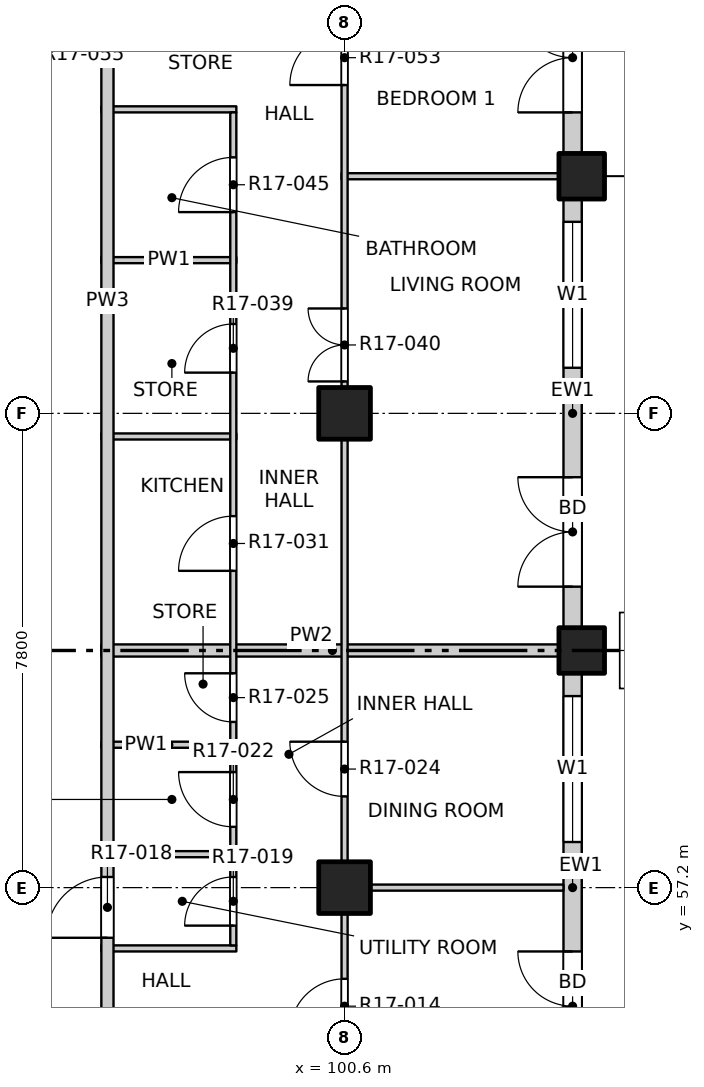
"""IFC4 building model, lengths in metres.
Left out: names, types, materials, properties, quantities, classifications, styles, units other than length and angle.
Written with IfcOpenShell. Run it as: python <this file> out.ifc"""

import sys

from ifc_helpers import new_model, si_unit, direction, frame, frame_2d, origin, origin_2d, place, context, subcontext, project, spatial, rectangle, extrude, element, fill, save


model = new_model("IFC4")
c1 = context("Model", 3, precision=1e-05, world=origin(), true_north=direction((0.0, 1.0)))
c2 = subcontext(c1, "Body", "Model", "MODEL_VIEW")
j1 = project(units=[si_unit("LENGTHUNIT", "METRE"), si_unit("PLANEANGLEUNIT", "RADIAN")], contexts=[c1])
p1 = place(None, origin())
s1 = spatial("IfcSite", under=j1, at=p1, CompositionType="ELEMENT")
p2 = place(p1, origin())
s2 = spatial("IfcBuilding", under=s1, at=p2, CompositionType="ELEMENT")
p3 = place(p2, frame((0.0, 0.0, 182.6)))
s3 = spatial("IfcBuildingStorey", under=s2, at=p3, CompositionType="ELEMENT", Elevation=182.6)
for number, where, z_axis, x_axis in (
    (1, (104.5, 61.1, -0.25), (0.0, 0.0, 1.0), (1.0, 0.0, 0.0)),
    (2, (104.5, 68.9, -0.25), (0.0, 0.0, 1.0), (1.0, 0.0, 0.0)),
):
    element("IfcColumn", number, at=place(p3, frame(where, z_axis=z_axis, x_axis=x_axis)), inside=s3, PredefinedType="COLUMN", context=c2, shape_type="SweptSolid", body=[
        extrude(rectangle(XDim=0.75, YDim=0.75, at=origin_2d()), origin(), (0.0, 0.0, 1.0), 3.4),
    ])
for number, where, z_axis, x_axis in (
    (3, (100.6, 57.2, -0.25), (0.0, 0.0, 1.0), (1.0, 0.0, 0.0)),
    (4, (100.6, 65.0, -0.25), (0.0, 0.0, 1.0), (1.0, 0.0, 0.0)),
):
    element("IfcColumn", number, at=place(p3, frame(where, z_axis=z_axis, x_axis=x_axis)), inside=s3, PredefinedType="COLUMN", context=c2, shape_type="SweptSolid", body=[
        extrude(rectangle(XDim=0.85, YDim=0.85, at=origin_2d()), origin(), (0.0, 0.0, 1.0), 3.4),
    ])
p4 = place(p3, frame((104.35, 53.675, 0.0), z_axis=(0.0, 0.0, 1.0), x_axis=(0.0, 1.0, 0.0)))
e5 = element("IfcWall", 5, at=p4, inside=s3, PredefinedType="SOLIDWALL", context=c2, shape_type="SweptSolid", body=[
    extrude(rectangle(XDim=7.05, YDim=0.3, at=frame_2d((3.525, 0.0))), origin(), (0.0, 0.0, 1.0), 2.7),
])
p5 = place(p4, frame((0.675, 0.0, 0.0)))
e6 = element("IfcOpeningElement", 6, at=p5, cuts=e5, PredefinedType="OPENING", context=c2, shape_type="SweptSolid", body=[
    extrude(rectangle(XDim=1.8, YDim=2.4, at=frame_2d((0.9, 1.2))), frame((0.0, 0.16, 0.0), z_axis=(0.0, -1.0, 0.0), x_axis=(1.0, 0.0, 0.0)), (0.0, 0.0, 1.0), 0.32),
])
p6 = place(p4, frame((4.275, 0.0, 0.9)))
e7 = element("IfcOpeningElement", 7, at=p6, cuts=e5, PredefinedType="OPENING", context=c2, shape_type="SweptSolid", body=[
    extrude(rectangle(XDim=2.4, YDim=1.8, at=frame_2d((1.2, 0.9))), frame((0.0, 0.16, 0.0), z_axis=(0.0, -1.0, 0.0), x_axis=(1.0, 0.0, 0.0)), (0.0, 0.0, 1.0), 0.32),
])
p7 = place(p3, frame((104.35, 61.475, 0.0), z_axis=(0.0, 0.0, 1.0), x_axis=(0.0, 1.0, 0.0)))
e8 = element("IfcWall", 8, at=p7, inside=s3, PredefinedType="SOLIDWALL", context=c2, shape_type="SweptSolid", body=[
    extrude(rectangle(XDim=7.05, YDim=0.3, at=frame_2d((3.525, 0.0))), origin(), (0.0, 0.0, 1.0), 2.7),
])
p8 = place(p7, frame((0.675, 0.0, 0.0)))
e9 = element("IfcOpeningElement", 9, at=p8, cuts=e8, PredefinedType="OPENING", context=c2, shape_type="SweptSolid", body=[
    extrude(rectangle(XDim=1.8, YDim=2.4, at=frame_2d((0.9, 1.2))), frame((0.0, 0.16, 0.0), z_axis=(0.0, -1.0, 0.0), x_axis=(1.0, 0.0, 0.0)), (0.0, 0.0, 1.0), 0.32),
])
p9 = place(p7, frame((4.275, 0.0, 0.9)))
e10 = element("IfcOpeningElement", 10, at=p9, cuts=e8, PredefinedType="OPENING", context=c2, shape_type="SweptSolid", body=[
    extrude(rectangle(XDim=2.4, YDim=1.8, at=frame_2d((1.2, 0.9))), frame((0.0, 0.16, 0.0), z_axis=(0.0, -1.0, 0.0), x_axis=(1.0, 0.0, 0.0)), (0.0, 0.0, 1.0), 0.32),
])
p10 = place(p3, frame((104.35, 69.275, 0.0), z_axis=(0.0, 0.0, 1.0), x_axis=(0.0, 1.0, 0.0)))
e11 = element("IfcWall", 11, at=p10, inside=s3, PredefinedType="SOLIDWALL", context=c2, shape_type="SweptSolid", body=[
    extrude(rectangle(XDim=7.05, YDim=0.3, at=frame_2d((3.525, 0.0))), origin(), (0.0, 0.0, 1.0), 2.7),
])
p11 = place(p10, frame((0.675, 0.0, 0.0)))
e12 = element("IfcOpeningElement", 12, at=p11, cuts=e11, PredefinedType="OPENING", context=c2, shape_type="SweptSolid", body=[
    extrude(rectangle(XDim=1.8, YDim=2.4, at=frame_2d((0.9, 1.2))), frame((0.0, 0.16, 0.0), z_axis=(0.0, -1.0, 0.0), x_axis=(1.0, 0.0, 0.0)), (0.0, 0.0, 1.0), 0.32),
])
p12 = place(p10, frame((4.275, 0.0, 0.9)))
e13 = element("IfcOpeningElement", 13, at=p12, cuts=e11, PredefinedType="OPENING", context=c2, shape_type="SweptSolid", body=[
    extrude(rectangle(XDim=2.4, YDim=1.8, at=frame_2d((1.2, 0.9))), frame((0.0, 0.16, 0.0), z_axis=(0.0, -1.0, 0.0), x_axis=(1.0, 0.0, 0.0)), (0.0, 0.0, 1.0), 0.32),
])
p13 = place(p3, frame((96.6, 56.2, 0.0), z_axis=(0.0, 0.0, 1.0), x_axis=(1.0, 0.0, 0.0)))
e14 = element("IfcWall", 14, at=p13, inside=s3, PredefinedType="PARTITIONING", context=c2, shape_type="SweptSolid", body=[
    extrude(rectangle(XDim=2.22, YDim=0.1, at=frame_2d((1.11, 0.0))), origin(), (0.0, 0.0, 1.0), 3.15),
])
p14 = place(p3, frame((100.55, 57.2, 0.0), z_axis=(0.0, 0.0, 1.0), x_axis=(1.0, 0.0, 0.0)))
e15 = element("IfcWall", 15, at=p14, inside=s3, PredefinedType="PARTITIONING", context=c2, shape_type="SweptSolid", body=[
    extrude(rectangle(XDim=3.65, YDim=0.1, at=frame_2d((1.825, 0.0))), origin(), (0.0, 0.0, 1.0), 3.15),
])
for number, where, z_axis, x_axis in (
    (16, (96.6, 57.75, 0.0), (0.0, 0.0, 1.0), (1.0, 0.0, 0.0)),
    (17, (96.6, 59.55, 0.0), (0.0, 0.0, 1.0), (1.0, 0.0, 0.0)),
):
    element("IfcWall", number, at=place(p3, frame(where, z_axis=z_axis, x_axis=x_axis)), inside=s3, PredefinedType="PARTITIONING", context=c2, shape_type="SweptSolid", body=[
        extrude(rectangle(XDim=2.22, YDim=0.1, at=frame_2d((1.11, 0.0))), origin(), (0.0, 0.0, 1.0), 3.15),
    ])
p15 = place(p3, frame((96.6, 61.1, 0.0), z_axis=(0.0, 0.0, 1.0), x_axis=(1.0, 0.0, 0.0)))
e18 = element("IfcWall", 18, at=p15, inside=s3, PredefinedType="PARTITIONING", context=c2, shape_type="SweptSolid", body=[
    extrude(rectangle(XDim=7.6, YDim=0.2, at=frame_2d((3.8, 0.0))), origin(), (0.0, 0.0, 1.0), 2.55),
])
for number, where, z_axis, x_axis in (
    (19, (96.6, 64.62, 0.0), (0.0, 0.0, 1.0), (1.0, 0.0, 0.0)),
    (20, (96.6, 67.52, 0.0), (0.0, 0.0, 1.0), (1.0, 0.0, 0.0)),
):
    element("IfcWall", number, at=place(p3, frame(where, z_axis=z_axis, x_axis=x_axis)), inside=s3, PredefinedType="PARTITIONING", context=c2, shape_type="SweptSolid", body=[
        extrude(rectangle(XDim=2.22, YDim=0.1, at=frame_2d((1.11, 0.0))), origin(), (0.0, 0.0, 1.0), 3.15),
    ])
p16 = place(p3, frame((100.55, 68.9, 0.0), z_axis=(0.0, 0.0, 1.0), x_axis=(1.0, 0.0, 0.0)))
e21 = element("IfcWall", 21, at=p16, inside=s3, PredefinedType="PARTITIONING", context=c2, shape_type="SweptSolid", body=[
    extrude(rectangle(XDim=3.65, YDim=0.1, at=frame_2d((1.825, 0.0))), origin(), (0.0, 0.0, 1.0), 2.55),
])
p17 = place(p3, frame((96.6, 70.0, 0.0), z_axis=(0.0, 0.0, 1.0), x_axis=(1.0, 0.0, 0.0)))
e22 = element("IfcWall", 22, at=p17, inside=s3, PredefinedType="PARTITIONING", context=c2, shape_type="SweptSolid", body=[
    extrude(rectangle(XDim=2.22, YDim=0.1, at=frame_2d((1.11, 0.0))), origin(), (0.0, 0.0, 1.0), 3.15),
])
p18 = place(p3, frame((96.7, 49.5, 0.0), z_axis=(0.0, 0.0, 1.0), x_axis=(0.0, 1.0, 0.0)))
e23 = element("IfcWall", 23, at=p18, inside=s3, PredefinedType="PARTITIONING", context=c2, shape_type="SweptSolid", body=[
    extrude(rectangle(XDim=34.7, YDim=0.2, at=frame_2d((17.35, 0.0))), origin(), (0.0, 0.0, 1.0), 3.15),
])
p19 = place(p18, frame((6.875, 0.0, 0.0)))
e24 = element("IfcOpeningElement", 24, at=p19, cuts=e23, PredefinedType="OPENING", context=c2, shape_type="SweptSolid", body=[
    extrude(rectangle(XDim=1.0, YDim=2.1, at=frame_2d((0.5, 1.05))), frame((0.0, 0.11, 0.0), z_axis=(0.0, -1.0, 0.0), x_axis=(1.0, 0.0, 0.0)), (0.0, 0.0, 1.0), 0.22),
])
p20 = place(p18, frame((21.775, 0.0, 0.0)))
e25 = element("IfcOpeningElement", 25, at=p20, cuts=e23, PredefinedType="OPENING", context=c2, shape_type="SweptSolid", body=[
    extrude(rectangle(XDim=1.0, YDim=2.1, at=frame_2d((0.5, 1.05))), frame((0.0, 0.11, 0.0), z_axis=(0.0, -1.0, 0.0), x_axis=(1.0, 0.0, 0.0)), (0.0, 0.0, 1.0), 0.22),
])
p21 = place(p18, frame((27.725, 0.0, 0.0)))
e26 = element("IfcOpeningElement", 26, at=p21, cuts=e23, PredefinedType="OPENING", context=c2, shape_type="SweptSolid", body=[
    extrude(rectangle(XDim=1.0, YDim=2.1, at=frame_2d((0.5, 1.05))), frame((0.0, 0.11, 0.0), z_axis=(0.0, -1.0, 0.0), x_axis=(1.0, 0.0, 0.0)), (0.0, 0.0, 1.0), 0.22),
])
p22 = place(p3, frame((98.77, 56.25, 0.0), z_axis=(0.0, 0.0, 1.0), x_axis=(0.0, 1.0, 0.0)))
e27 = element("IfcWall", 27, at=p22, inside=s3, PredefinedType="PARTITIONING", context=c2, shape_type="SweptSolid", body=[
    extrude(rectangle(XDim=13.7, YDim=0.1, at=frame_2d((6.85, 0.0))), origin(), (0.0, 0.0, 1.0), 3.15),
])
p23 = place(p22, frame((0.325, 0.0, 0.0)))
e28 = element("IfcOpeningElement", 28, at=p23, cuts=e27, PredefinedType="OPENING", context=c2, shape_type="SweptSolid", body=[
    extrude(rectangle(XDim=0.8, YDim=2.1, at=frame_2d((0.4, 1.05))), frame((0.0, 0.06, 0.0), z_axis=(0.0, -1.0, 0.0), x_axis=(1.0, 0.0, 0.0)), (0.0, 0.0, 1.0), 0.12),
])
p24 = place(p22, frame((1.95, 0.0, 0.0)))
e29 = element("IfcOpeningElement", 29, at=p24, cuts=e27, PredefinedType="OPENING", context=c2, shape_type="SweptSolid", body=[
    extrude(rectangle(XDim=0.9, YDim=2.1, at=frame_2d((0.45, 1.05))), frame((0.0, 0.06, 0.0), z_axis=(0.0, -1.0, 0.0), x_axis=(1.0, 0.0, 0.0)), (0.0, 0.0, 1.0), 0.12),
])
p25 = place(p22, frame((3.675, 0.0, 0.0)))
e30 = element("IfcOpeningElement", 30, at=p25, cuts=e27, PredefinedType="OPENING", context=c2, shape_type="SweptSolid", body=[
    extrude(rectangle(XDim=0.8, YDim=2.1, at=frame_2d((0.4, 1.05))), frame((0.0, 0.06, 0.0), z_axis=(0.0, -1.0, 0.0), x_axis=(1.0, 0.0, 0.0)), (0.0, 0.0, 1.0), 0.12),
])
p26 = place(p22, frame((6.16, 0.0, 0.0)))
e31 = element("IfcOpeningElement", 31, at=p26, cuts=e27, PredefinedType="OPENING", context=c2, shape_type="SweptSolid", body=[
    extrude(rectangle(XDim=0.9, YDim=2.1, at=frame_2d((0.45, 1.05))), frame((0.0, 0.06, 0.0), z_axis=(0.0, -1.0, 0.0), x_axis=(1.0, 0.0, 0.0)), (0.0, 0.0, 1.0), 0.12),
])
p27 = place(p22, frame((9.42, 0.0, 0.0)))
e32 = element("IfcOpeningElement", 32, at=p27, cuts=e27, PredefinedType="OPENING", context=c2, shape_type="SweptSolid", body=[
    extrude(rectangle(XDim=0.8, YDim=2.1, at=frame_2d((0.4, 1.05))), frame((0.0, 0.06, 0.0), z_axis=(0.0, -1.0, 0.0), x_axis=(1.0, 0.0, 0.0)), (0.0, 0.0, 1.0), 0.12),
])
p28 = place(p22, frame((12.06, 0.0, 0.0)))
e33 = element("IfcOpeningElement", 33, at=p28, cuts=e27, PredefinedType="OPENING", context=c2, shape_type="SweptSolid", body=[
    extrude(rectangle(XDim=0.9, YDim=2.1, at=frame_2d((0.45, 1.05))), frame((0.0, 0.06, 0.0), z_axis=(0.0, -1.0, 0.0), x_axis=(1.0, 0.0, 0.0)), (0.0, 0.0, 1.0), 0.12),
])
p29 = place(p3, frame((100.6, 45.8, 0.0), z_axis=(0.0, 0.0, 1.0), x_axis=(0.0, 1.0, 0.0)))
e34 = element("IfcWall", 34, at=p29, inside=s3, PredefinedType="PARTITIONING", context=c2, shape_type="SweptSolid", body=[
    extrude(rectangle(XDim=38.4, YDim=0.1, at=frame_2d((19.2, 0.0))), origin(), (0.0, 0.0, 1.0), 3.15),
])
p30 = place(p29, frame((1.05, 0.0, 0.0)))
e35 = element("IfcOpeningElement", 35, at=p30, cuts=e34, PredefinedType="OPENING", context=c2, shape_type="SweptSolid", body=[
    extrude(rectangle(XDim=1.2, YDim=2.1, at=frame_2d((0.6, 1.05))), frame((0.0, 0.06, 0.0), z_axis=(0.0, -1.0, 0.0), x_axis=(1.0, 0.0, 0.0)), (0.0, 0.0, 1.0), 0.12),
])
p31 = place(p29, frame((5.1, 0.0, 0.0)))
e36 = element("IfcOpeningElement", 36, at=p31, cuts=e34, PredefinedType="OPENING", context=c2, shape_type="SweptSolid", body=[
    extrude(rectangle(XDim=0.9, YDim=2.1, at=frame_2d((0.45, 1.05))), frame((0.0, 0.06, 0.0), z_axis=(0.0, -1.0, 0.0), x_axis=(1.0, 0.0, 0.0)), (0.0, 0.0, 1.0), 0.12),
])
p32 = place(p29, frame((9.0, 0.0, 0.0)))
e37 = element("IfcOpeningElement", 37, at=p32, cuts=e34, PredefinedType="OPENING", context=c2, shape_type="SweptSolid", body=[
    extrude(rectangle(XDim=0.9, YDim=2.1, at=frame_2d((0.45, 1.05))), frame((0.0, 0.06, 0.0), z_axis=(0.0, -1.0, 0.0), x_axis=(1.0, 0.0, 0.0)), (0.0, 0.0, 1.0), 0.12),
])
p33 = place(p29, frame((12.9, 0.0, 0.0)))
e38 = element("IfcOpeningElement", 38, at=p33, cuts=e34, PredefinedType="OPENING", context=c2, shape_type="SweptSolid", body=[
    extrude(rectangle(XDim=0.9, YDim=2.1, at=frame_2d((0.45, 1.05))), frame((0.0, 0.06, 0.0), z_axis=(0.0, -1.0, 0.0), x_axis=(1.0, 0.0, 0.0)), (0.0, 0.0, 1.0), 0.12),
])
p34 = place(p29, frame((19.725, 0.0, 0.0)))
e39 = element("IfcOpeningElement", 39, at=p34, cuts=e34, PredefinedType="OPENING", context=c2, shape_type="SweptSolid", body=[
    extrude(rectangle(XDim=1.2, YDim=2.1, at=frame_2d((0.6, 1.05))), frame((0.0, 0.06, 0.0), z_axis=(0.0, -1.0, 0.0), x_axis=(1.0, 0.0, 0.0)), (0.0, 0.0, 1.0), 0.12),
])
p35 = place(p29, frame((24.6, 0.0, 0.0)))
e40 = element("IfcOpeningElement", 40, at=p35, cuts=e34, PredefinedType="OPENING", context=c2, shape_type="SweptSolid", body=[
    extrude(rectangle(XDim=0.9, YDim=2.1, at=frame_2d((0.45, 1.05))), frame((0.0, 0.06, 0.0), z_axis=(0.0, -1.0, 0.0), x_axis=(1.0, 0.0, 0.0)), (0.0, 0.0, 1.0), 0.12),
])
p36 = place(p29, frame((28.5, 0.0, 0.0)))
e41 = element("IfcOpeningElement", 41, at=p36, cuts=e34, PredefinedType="OPENING", context=c2, shape_type="SweptSolid", body=[
    extrude(rectangle(XDim=0.9, YDim=2.1, at=frame_2d((0.45, 1.05))), frame((0.0, 0.06, 0.0), z_axis=(0.0, -1.0, 0.0), x_axis=(1.0, 0.0, 0.0)), (0.0, 0.0, 1.0), 0.12),
])
p37 = place(p29, frame((32.4, 0.0, 0.0)))
e42 = element("IfcOpeningElement", 42, at=p37, cuts=e34, PredefinedType="OPENING", context=c2, shape_type="SweptSolid", body=[
    extrude(rectangle(XDim=0.9, YDim=2.1, at=frame_2d((0.45, 1.05))), frame((0.0, 0.06, 0.0), z_axis=(0.0, -1.0, 0.0), x_axis=(1.0, 0.0, 0.0)), (0.0, 0.0, 1.0), 0.12),
])
p38 = place(p29, frame((36.15, 0.0, 0.0)))
e43 = element("IfcOpeningElement", 43, at=p38, cuts=e34, PredefinedType="OPENING", context=c2, shape_type="SweptSolid", body=[
    extrude(rectangle(XDim=1.2, YDim=2.1, at=frame_2d((0.6, 1.05))), frame((0.0, 0.06, 0.0), z_axis=(0.0, -1.0, 0.0), x_axis=(1.0, 0.0, 0.0)), (0.0, 0.0, 1.0), 0.12),
])
p39 = place(p5, origin())
e44 = element("IfcDoor", 44, at=p39, inside=s3, OperationType="DOUBLE_DOOR_SINGLE_SWING", PredefinedType="DOOR", context=c2, shape_type="SweptSolid", body=[
    extrude(rectangle(XDim=1.8, YDim=2.4, at=frame_2d((0.9, 1.2))), frame((0.0, 0.025, 0.0), z_axis=(0.0, -1.0, 0.0), x_axis=(1.0, 0.0, 0.0)), (0.0, 0.0, 1.0), 0.05),
])
fill(e6, e44)
p40 = place(p6, origin())
e45 = element("IfcWindow", 45, at=p40, inside=s3, PartitioningType="DOUBLE_PANEL_VERTICAL", PredefinedType="WINDOW", context=c2, shape_type="SweptSolid", body=[
    extrude(rectangle(XDim=2.4, YDim=1.8, at=frame_2d((1.2, 0.9))), frame((0.0, 0.03, 0.0), z_axis=(0.0, -1.0, 0.0), x_axis=(1.0, 0.0, 0.0)), (0.0, 0.0, 1.0), 0.06),
])
fill(e7, e45)
p41 = place(p8, origin())
e46 = element("IfcDoor", 46, at=p41, inside=s3, OperationType="DOUBLE_DOOR_SINGLE_SWING", PredefinedType="DOOR", context=c2, shape_type="SweptSolid", body=[
    extrude(rectangle(XDim=1.8, YDim=2.4, at=frame_2d((0.9, 1.2))), frame((0.0, 0.025, 0.0), z_axis=(0.0, -1.0, 0.0), x_axis=(1.0, 0.0, 0.0)), (0.0, 0.0, 1.0), 0.05),
])
fill(e9, e46)
p42 = place(p9, origin())
e47 = element("IfcWindow", 47, at=p42, inside=s3, PartitioningType="DOUBLE_PANEL_VERTICAL", PredefinedType="WINDOW", context=c2, shape_type="SweptSolid", body=[
    extrude(rectangle(XDim=2.4, YDim=1.8, at=frame_2d((1.2, 0.9))), frame((0.0, 0.03, 0.0), z_axis=(0.0, -1.0, 0.0), x_axis=(1.0, 0.0, 0.0)), (0.0, 0.0, 1.0), 0.06),
])
fill(e10, e47)
p43 = place(p11, origin())
e48 = element("IfcDoor", 48, at=p43, inside=s3, OperationType="DOUBLE_DOOR_SINGLE_SWING", PredefinedType="DOOR", context=c2, shape_type="SweptSolid", body=[
    extrude(rectangle(XDim=1.8, YDim=2.4, at=frame_2d((0.9, 1.2))), frame((0.0, 0.025, 0.0), z_axis=(0.0, -1.0, 0.0), x_axis=(1.0, 0.0, 0.0)), (0.0, 0.0, 1.0), 0.05),
])
fill(e12, e48)
p44 = place(p32, origin())
e49 = element("IfcDoor", 49, at=p44, inside=s3, OperationType="SINGLE_SWING_LEFT", PredefinedType="DOOR", context=c2, shape_type="SweptSolid", body=[
    extrude(rectangle(XDim=0.9, YDim=2.1, at=frame_2d((0.45, 1.05))), frame((0.0, 0.025, 0.0), z_axis=(0.0, -1.0, 0.0), x_axis=(1.0, 0.0, 0.0)), (0.0, 0.0, 1.0), 0.05),
])
fill(e37, e49)
p45 = place(p19, origin())
e50 = element("IfcDoor", 50, at=p45, inside=s3, OperationType="SINGLE_SWING_LEFT", PredefinedType="DOOR", context=c2, shape_type="SweptSolid", body=[
    extrude(rectangle(XDim=1.0, YDim=2.1, at=frame_2d((0.5, 1.05))), frame((0.0, 0.025, 0.0), z_axis=(0.0, -1.0, 0.0), x_axis=(1.0, 0.0, 0.0)), (0.0, 0.0, 1.0), 0.05),
])
fill(e24, e50)
p46 = place(p23, origin())
e51 = element("IfcDoor", 51, at=p46, inside=s3, OperationType="SINGLE_SWING_LEFT", PredefinedType="DOOR", context=c2, shape_type="SweptSolid", body=[
    extrude(rectangle(XDim=0.8, YDim=2.1, at=frame_2d((0.4, 1.05))), frame((0.0, 0.025, 0.0), z_axis=(0.0, -1.0, 0.0), x_axis=(1.0, 0.0, 0.0)), (0.0, 0.0, 1.0), 0.05),
])
fill(e28, e51)
p47 = place(p24, origin())
e52 = element("IfcDoor", 52, at=p47, inside=s3, OperationType="SINGLE_SWING_RIGHT", PredefinedType="DOOR", context=c2, shape_type="SweptSolid", body=[
    extrude(rectangle(XDim=0.9, YDim=2.1, at=frame_2d((0.45, 1.05))), frame((0.0, 0.025, 0.0), z_axis=(0.0, -1.0, 0.0), x_axis=(1.0, 0.0, 0.0)), (0.0, 0.0, 1.0), 0.05),
])
fill(e29, e52)
p48 = place(p33, origin())
e53 = element("IfcDoor", 53, at=p48, inside=s3, OperationType="SINGLE_SWING_RIGHT", PredefinedType="DOOR", context=c2, shape_type="SweptSolid", body=[
    extrude(rectangle(XDim=0.9, YDim=2.1, at=frame_2d((0.45, 1.05))), frame((0.0, 0.025, 0.0), z_axis=(0.0, -1.0, 0.0), x_axis=(1.0, 0.0, 0.0)), (0.0, 0.0, 1.0), 0.05),
])
fill(e38, e53)
p49 = place(p25, origin())
e54 = element("IfcDoor", 54, at=p49, inside=s3, OperationType="SINGLE_SWING_RIGHT", PredefinedType="DOOR", context=c2, shape_type="SweptSolid", body=[
    extrude(rectangle(XDim=0.8, YDim=2.1, at=frame_2d((0.4, 1.05))), frame((0.0, 0.025, 0.0), z_axis=(0.0, -1.0, 0.0), x_axis=(1.0, 0.0, 0.0)), (0.0, 0.0, 1.0), 0.05),
])
fill(e30, e54)
p50 = place(p26, origin())
e55 = element("IfcDoor", 55, at=p50, inside=s3, OperationType="SINGLE_SWING_LEFT", PredefinedType="DOOR", context=c2, shape_type="SweptSolid", body=[
    extrude(rectangle(XDim=0.9, YDim=2.1, at=frame_2d((0.45, 1.05))), frame((0.0, 0.025, 0.0), z_axis=(0.0, -1.0, 0.0), x_axis=(1.0, 0.0, 0.0)), (0.0, 0.0, 1.0), 0.05),
])
fill(e31, e55)
p51 = place(p27, origin())
e56 = element("IfcDoor", 56, at=p51, inside=s3, OperationType="SINGLE_SWING_LEFT", PredefinedType="DOOR", context=c2, shape_type="SweptSolid", body=[
    extrude(rectangle(XDim=0.8, YDim=2.1, at=frame_2d((0.4, 1.05))), frame((0.0, 0.025, 0.0), z_axis=(0.0, -1.0, 0.0), x_axis=(1.0, 0.0, 0.0)), (0.0, 0.0, 1.0), 0.05),
])
fill(e32, e56)
p52 = place(p34, origin())
e57 = element("IfcDoor", 57, at=p52, inside=s3, OperationType="DOUBLE_DOOR_SINGLE_SWING", PredefinedType="DOOR", context=c2, shape_type="SweptSolid", body=[
    extrude(rectangle(XDim=1.2, YDim=2.1, at=frame_2d((0.6, 1.05))), frame((0.0, 0.025, 0.0), z_axis=(0.0, -1.0, 0.0), x_axis=(1.0, 0.0, 0.0)), (0.0, 0.0, 1.0), 0.05),
])
fill(e39, e57)
p53 = place(p28, origin())
e58 = element("IfcDoor", 58, at=p53, inside=s3, OperationType="SINGLE_SWING_LEFT", PredefinedType="DOOR", context=c2, shape_type="SweptSolid", body=[
    extrude(rectangle(XDim=0.9, YDim=2.1, at=frame_2d((0.45, 1.05))), frame((0.0, 0.025, 0.0), z_axis=(0.0, -1.0, 0.0), x_axis=(1.0, 0.0, 0.0)), (0.0, 0.0, 1.0), 0.05),
])
fill(e33, e58)
p54 = place(p35, origin())
e59 = element("IfcDoor", 59, at=p54, inside=s3, OperationType="SINGLE_SWING_LEFT", PredefinedType="DOOR", context=c2, shape_type="SweptSolid", body=[
    extrude(rectangle(XDim=0.9, YDim=2.1, at=frame_2d((0.45, 1.05))), frame((0.0, 0.025, 0.0), z_axis=(0.0, -1.0, 0.0), x_axis=(1.0, 0.0, 0.0)), (0.0, 0.0, 1.0), 0.05),
])
fill(e40, e59)
save(model, sys.argv[1])
